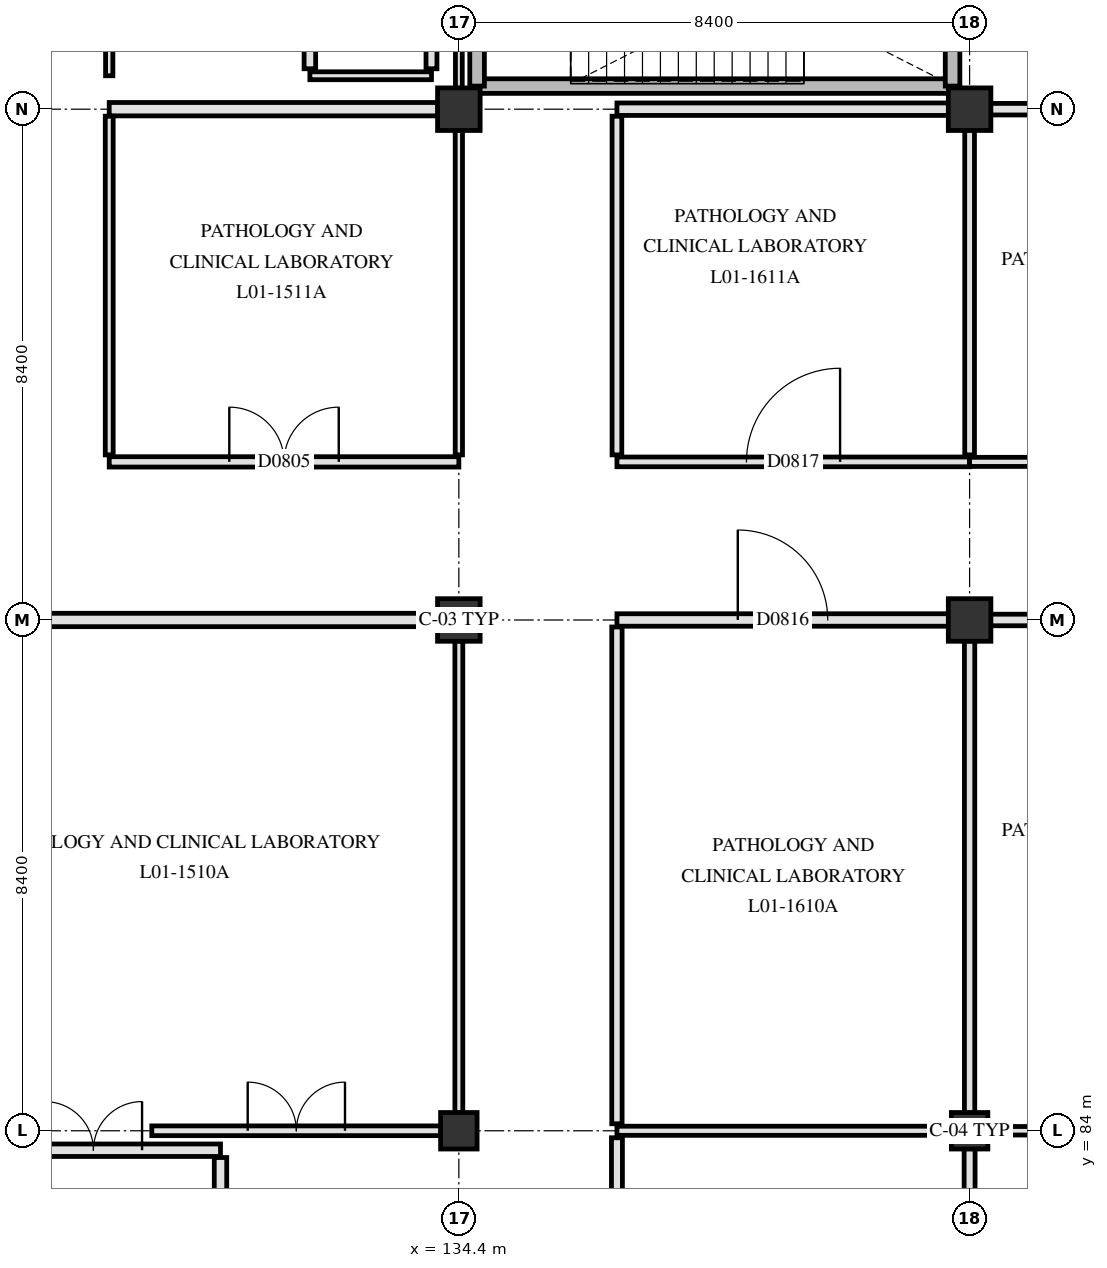
"""IFC4 building model, lengths in metres.
Left out: names, types, materials, properties, quantities, classifications, styles, units other than length and angle.
Written with IfcOpenShell. Run it as: python <this file> out.ifc"""

import sys

from ifc_helpers import new_model, si_unit, direction, frame, frame_2d, origin, origin_2d, place, context, subcontext, project, spatial, rectangle, extrude, element, fill, save


model = new_model("IFC4")
c1 = context("Model", 3, precision=1e-05, world=origin(), true_north=direction((0.0, 1.0)))
c2 = subcontext(c1, "Body", "Model", "MODEL_VIEW")
j1 = project(units=[si_unit("LENGTHUNIT", "METRE"), si_unit("PLANEANGLEUNIT", "RADIAN")], contexts=[c1])
p1 = place(None, origin())
s1 = spatial("IfcSite", under=j1, at=p1, CompositionType="ELEMENT")
p2 = place(p1, origin())
s2 = spatial("IfcBuilding", under=s1, at=p2, CompositionType="ELEMENT")
p3 = place(p2, frame((0.0, 0.0, 4.8)))
s3 = spatial("IfcBuildingStorey", under=s2, at=p3, CompositionType="ELEMENT", Elevation=4.8)
p4 = place(p3, frame((134.4, 84.0, 0.0), z_axis=(0.0, 0.0, 1.0), x_axis=(1.0, 0.0, 0.0)))
e1 = element("IfcColumn", 1, at=p4, inside=s3, PredefinedType="COLUMN", context=c2, shape_type="SweptSolid", body=[
    extrude(rectangle(XDim=0.6, YDim=0.6, at=origin_2d()), origin(), (0.0, 0.0, 1.0), 4.5),
])
for number, where, z_axis, x_axis in (
    (2, (134.4, 92.4, 0.0), (0.0, 0.0, 1.0), (1.0, 0.0, 0.0)),
    (3, (134.4, 100.8, 0.0), (0.0, 0.0, 1.0), (1.0, 0.0, 0.0)),
):
    element("IfcColumn", number, at=place(p3, frame(where, z_axis=z_axis, x_axis=x_axis)), inside=s3, PredefinedType="COLUMN", context=c2, shape_type="SweptSolid", body=[
        extrude(rectangle(XDim=0.7, YDim=0.7, at=origin_2d()), origin(), (0.0, 0.0, 1.0), 4.5),
    ])
p5 = place(p3, frame((142.8, 84.0, 0.0), z_axis=(0.0, 0.0, 1.0), x_axis=(1.0, 0.0, 0.0)))
e4 = element("IfcColumn", 4, at=p5, inside=s3, PredefinedType="COLUMN", context=c2, shape_type="SweptSolid", body=[
    extrude(rectangle(XDim=0.6, YDim=0.6, at=origin_2d()), origin(), (0.0, 0.0, 1.0), 4.5),
])
for number, where, z_axis, x_axis in (
    (5, (142.8, 92.4, 0.0), (0.0, 0.0, 1.0), (1.0, 0.0, 0.0)),
    (6, (142.8, 100.8, 0.0), (0.0, 0.0, 1.0), (1.0, 0.0, 0.0)),
):
    element("IfcColumn", number, at=place(p3, frame(where, z_axis=z_axis, x_axis=x_axis)), inside=s3, PredefinedType="COLUMN", context=c2, shape_type="SweptSolid", body=[
        extrude(rectangle(XDim=0.7, YDim=0.7, at=origin_2d()), origin(), (0.0, 0.0, 1.0), 4.5),
    ])
p6 = place(p3, frame((134.7, 101.18, 0.0), z_axis=(0.0, 0.0, 1.0), x_axis=(1.0, 0.0, 0.0)))
e7 = element("IfcWall", 7, at=p6, inside=s3, PredefinedType="SHEAR", context=c2, shape_type="SweptSolid", body=[
    extrude(rectangle(XDim=7.82, YDim=0.24, at=frame_2d((3.91, 0.0))), origin(), (0.0, 0.0, 1.0), 4.15),
])
for number, where, z_axis, x_axis in (
    (8, (134.7, 101.18, 0.0), (0.0, 0.0, 1.0), (0.0, 1.0, 0.0)),
    (9, (142.52, 101.18, 0.0), (0.0, 0.0, 1.0), (0.0, 1.0, 0.0)),
):
    element("IfcWall", number, at=place(p3, frame(where, z_axis=z_axis, x_axis=x_axis)), inside=s3, PredefinedType="SHEAR", context=c2, shape_type="SweptSolid", body=[
        extrude(rectangle(XDim=3.32, YDim=0.24, at=frame_2d((1.66, 0.0))), origin(), (0.0, 0.0, 1.0), 4.15),
    ])
p7 = place(p3, frame((130.48, 79.44, 0.0), z_axis=(0.0, 0.0, 1.0), x_axis=(0.0, 1.0, 0.0)))
e10 = element("IfcWall", 10, at=p7, inside=s3, PredefinedType="PARTITIONING", context=c2, shape_type="SweptSolid", body=[
    extrude(rectangle(XDim=4.12, YDim=0.205, at=frame_2d((2.06, 0.0))), origin(), (0.0, 0.0, 1.0), 4.14),
])
p8 = place(p3, frame((126.3, 83.68, 0.0), z_axis=(0.0, 0.0, 1.0), x_axis=(1.0, 0.0, 0.0)))
e11 = element("IfcWall", 11, at=p8, inside=s3, PredefinedType="PARTITIONING", context=c2, shape_type="SweptSolid", body=[
    extrude(rectangle(XDim=4.18, YDim=0.205, at=frame_2d((2.09, 0.0))), origin(), (0.0, 0.0, 1.0), 3.54),
])
p9 = place(p8, frame((1.29, 0.0, 0.0)))
e12 = element("IfcOpeningElement", 12, at=p9, cuts=e11, PredefinedType="OPENING", context=c2, shape_type="SweptSolid", body=[
    extrude(rectangle(XDim=1.6, YDim=2.25, at=frame_2d((0.8, 1.125))), frame((0.0, 0.113, 0.0), z_axis=(0.0, -1.0, 0.0), x_axis=(1.0, 0.0, 0.0)), (0.0, 0.0, 1.0), 0.225),
])
p10 = place(p3, frame((129.35, 84.0, 0.0), z_axis=(0.0, 0.0, 1.0), x_axis=(1.0, 0.0, 0.0)))
e13 = element("IfcWall", 13, at=p10, inside=s3, PredefinedType="PARTITIONING", context=c2, shape_type="SweptSolid", body=[
    extrude(rectangle(XDim=4.755, YDim=0.16, at=frame_2d((2.377, 0.0))), origin(), (0.0, 0.0, 1.0), 3.54),
])
p11 = place(p10, frame((1.577, 0.0, 0.0)))
e14 = element("IfcOpeningElement", 14, at=p11, cuts=e13, PredefinedType="OPENING", context=c2, shape_type="SweptSolid", body=[
    extrude(rectangle(XDim=1.6, YDim=2.25, at=frame_2d((0.8, 1.125))), frame((0.0, 0.09, 0.0), z_axis=(0.0, -1.0, 0.0), x_axis=(1.0, 0.0, 0.0)), (0.0, 0.0, 1.0), 0.18),
])
p12 = place(p3, frame((137.0, 84.0, 0.0), z_axis=(0.0, 0.0, 1.0), x_axis=(1.0, 0.0, 0.0)))
e15 = element("IfcWall", 15, at=p12, inside=s3, PredefinedType="PARTITIONING", context=c2, shape_type="SweptSolid", body=[
    extrude(rectangle(XDim=5.505, YDim=0.15, at=frame_2d((2.752, 0.0))), origin(), (0.0, 0.0, 1.0), 3.54),
])
p13 = place(p3, frame((143.095, 84.0, 0.0), z_axis=(0.0, 0.0, 1.0), x_axis=(1.0, 0.0, 0.0)))
e16 = element("IfcWall", 16, at=p13, inside=s3, PredefinedType="PARTITIONING", context=c2, shape_type="SweptSolid", body=[
    extrude(rectangle(XDim=7.81, YDim=0.14, at=frame_2d((3.905, 0.0))), origin(), (0.0, 0.0, 1.0), 3.54),
])
p14 = place(p13, frame((3.295, 0.0, 0.0)))
e17 = element("IfcOpeningElement", 17, at=p14, cuts=e16, PredefinedType="OPENING", context=c2, shape_type="SweptSolid", body=[
    extrude(rectangle(XDim=1.22, YDim=2.18, at=frame_2d((0.61, 1.09))), frame((0.0, 0.08, 0.0), z_axis=(0.0, -1.0, 0.0), x_axis=(1.0, 0.0, 0.0)), (0.0, 0.0, 1.0), 0.16),
])
p15 = place(p3, frame((126.395, 92.4, 0.0), z_axis=(0.0, 0.0, 1.0), x_axis=(1.0, 0.0, 0.0)))
e18 = element("IfcWall", 18, at=p15, inside=s3, PredefinedType="PARTITIONING", context=c2, shape_type="SweptSolid", body=[
    extrude(rectangle(XDim=7.66, YDim=0.22, at=frame_2d((3.83, 0.0))), origin(), (0.0, 0.0, 1.0), 3.54),
])
p16 = place(p3, frame((137.0, 92.4, 0.0), z_axis=(0.0, 0.0, 1.0), x_axis=(1.0, 0.0, 0.0)))
e19 = element("IfcWall", 19, at=p16, inside=s3, PredefinedType="PARTITIONING", context=c2, shape_type="SweptSolid", body=[
    extrude(rectangle(XDim=5.455, YDim=0.205, at=frame_2d((2.728, 0.0))), origin(), (0.0, 0.0, 1.0), 3.54),
])
p17 = place(p16, frame((1.988, 0.0, 0.0)))
e20 = element("IfcOpeningElement", 20, at=p17, cuts=e19, PredefinedType="OPENING", context=c2, shape_type="SweptSolid", body=[
    extrude(rectangle(XDim=1.48, YDim=2.22, at=frame_2d((0.74, 1.11))), frame((0.0, 0.113, 0.0), z_axis=(0.0, -1.0, 0.0), x_axis=(1.0, 0.0, 0.0)), (0.0, 0.0, 1.0), 0.225),
])
p18 = place(p3, frame((143.145, 92.4, 0.0), z_axis=(0.0, 0.0, 1.0), x_axis=(1.0, 0.0, 0.0)))
e21 = element("IfcWall", 21, at=p18, inside=s3, PredefinedType="PARTITIONING", context=c2, shape_type="SweptSolid", body=[
    extrude(rectangle(XDim=7.71, YDim=0.19, at=frame_2d((3.855, 0.0))), origin(), (0.0, 0.0, 1.0), 3.54),
])
p19 = place(p18, frame((3.195, 0.0, 0.0)))
e22 = element("IfcOpeningElement", 22, at=p19, cuts=e21, PredefinedType="OPENING", context=c2, shape_type="SweptSolid", body=[
    extrude(rectangle(XDim=1.32, YDim=2.18, at=frame_2d((0.66, 1.09))), frame((0.0, 0.105, 0.0), z_axis=(0.0, -1.0, 0.0), x_axis=(1.0, 0.0, 0.0)), (0.0, 0.0, 1.0), 0.21),
])
p20 = place(p3, frame((128.65, 95.0, 0.0), z_axis=(0.0, 0.0, 1.0), x_axis=(1.0, 0.0, 0.0)))
e23 = element("IfcWall", 23, at=p20, inside=s3, PredefinedType="PARTITIONING", context=c2, shape_type="SweptSolid", body=[
    extrude(rectangle(XDim=5.75, YDim=0.17, at=frame_2d((2.875, 0.0))), origin(), (0.0, 0.0, 1.0), 3.59),
])
p21 = place(p20, frame((1.975, 0.0, 0.0)))
e24 = element("IfcOpeningElement", 24, at=p21, cuts=e23, PredefinedType="OPENING", context=c2, shape_type="SweptSolid", body=[
    extrude(rectangle(XDim=1.8, YDim=2.25, at=frame_2d((0.9, 1.125))), frame((0.0, 0.095, 0.0), z_axis=(0.0, -1.0, 0.0), x_axis=(1.0, 0.0, 0.0)), (0.0, 0.0, 1.0), 0.19),
])
p22 = place(p3, frame((137.0, 95.0, 0.0), z_axis=(0.0, 0.0, 1.0), x_axis=(1.0, 0.0, 0.0)))
e25 = element("IfcWall", 25, at=p22, inside=s3, PredefinedType="PARTITIONING", context=c2, shape_type="SweptSolid", body=[
    extrude(rectangle(XDim=5.8, YDim=0.16, at=frame_2d((2.9, 0.0))), origin(), (0.0, 0.0, 1.0), 3.59),
])
p23 = place(p22, frame((2.13, 0.0, 0.0)))
e26 = element("IfcOpeningElement", 26, at=p23, cuts=e25, PredefinedType="OPENING", context=c2, shape_type="SweptSolid", body=[
    extrude(rectangle(XDim=1.54, YDim=2.24, at=frame_2d((0.77, 1.12))), frame((0.0, 0.09, 0.0), z_axis=(0.0, -1.0, 0.0), x_axis=(1.0, 0.0, 0.0)), (0.0, 0.0, 1.0), 0.18),
])
p24 = place(p3, frame((142.8, 95.0, 0.0), z_axis=(0.0, 0.0, 1.0), x_axis=(1.0, 0.0, 0.0)))
e27 = element("IfcWall", 27, at=p24, inside=s3, PredefinedType="PARTITIONING", context=c2, shape_type="SweptSolid", body=[
    extrude(rectangle(XDim=8.4, YDim=0.15, at=frame_2d((4.2, 0.0))), origin(), (0.0, 0.0, 1.0), 3.59),
])
p25 = place(p24, frame((3.74, 0.0, 0.0)))
e28 = element("IfcOpeningElement", 28, at=p25, cuts=e27, PredefinedType="OPENING", context=c2, shape_type="SweptSolid", body=[
    extrude(rectangle(XDim=0.92, YDim=2.08, at=frame_2d((0.46, 1.04))), frame((0.0, 0.085, 0.0), z_axis=(0.0, -1.0, 0.0), x_axis=(1.0, 0.0, 0.0)), (0.0, 0.0, 1.0), 0.17),
])
p26 = place(p3, frame((128.65, 100.8, 0.0), z_axis=(0.0, 0.0, 1.0), x_axis=(1.0, 0.0, 0.0)))
e29 = element("IfcWall", 29, at=p26, inside=s3, PredefinedType="PARTITIONING", context=c2, shape_type="SweptSolid", body=[
    extrude(rectangle(XDim=5.405, YDim=0.22, at=frame_2d((2.703, 0.0))), origin(), (0.0, 0.0, 1.0), 3.54),
])
p27 = place(p3, frame((137.0, 100.8, 0.0), z_axis=(0.0, 0.0, 1.0), x_axis=(1.0, 0.0, 0.0)))
e30 = element("IfcWall", 30, at=p27, inside=s3, PredefinedType="PARTITIONING", context=c2, shape_type="SweptSolid", body=[
    extrude(rectangle(XDim=5.455, YDim=0.205, at=frame_2d((2.728, 0.0))), origin(), (0.0, 0.0, 1.0), 3.54),
])
p28 = place(p3, frame((143.145, 100.8, 0.0), z_axis=(0.0, 0.0, 1.0), x_axis=(1.0, 0.0, 0.0)))
e31 = element("IfcWall", 31, at=p28, inside=s3, PredefinedType="PARTITIONING", context=c2, shape_type="SweptSolid", body=[
    extrude(rectangle(XDim=7.71, YDim=0.19, at=frame_2d((3.855, 0.0))), origin(), (0.0, 0.0, 1.0), 3.54),
])
p29 = place(p3, frame((131.95, 101.35, 0.0), z_axis=(0.0, 0.0, 1.0), x_axis=(1.0, 0.0, 0.0)))
e32 = element("IfcWall", 32, at=p29, inside=s3, PredefinedType="PARTITIONING", context=c2, shape_type="SweptSolid", body=[
    extrude(rectangle(XDim=2.0, YDim=0.13, at=frame_2d((1.0, 0.0))), origin(), (0.0, 0.0, 1.0), 4.14),
])
p30 = place(p3, frame((128.65, 95.115, 0.0), z_axis=(0.0, 0.0, 1.0), x_axis=(0.0, 1.0, 0.0)))
e33 = element("IfcWall", 33, at=p30, inside=s3, PredefinedType="PARTITIONING", context=c2, shape_type="SweptSolid", body=[
    extrude(rectangle(XDim=5.57, YDim=0.13, at=frame_2d((2.785, 0.0))), origin(), (0.0, 0.0, 1.0), 3.54),
])
p31 = place(p3, frame((128.65, 101.35, 0.0), z_axis=(0.0, 0.0, 1.0), x_axis=(0.0, 1.0, 0.0)))
e34 = element("IfcWall", 34, at=p31, inside=s3, PredefinedType="PARTITIONING", context=c2, shape_type="SweptSolid", body=[
    extrude(rectangle(XDim=2.1, YDim=0.12, at=frame_2d((1.05, 0.0))), origin(), (0.0, 0.0, 1.0), 4.14),
])
p32 = place(p3, frame((131.95, 101.465, 0.0), z_axis=(0.0, 0.0, 1.0), x_axis=(0.0, 1.0, 0.0)))
e35 = element("IfcWall", 35, at=p32, inside=s3, PredefinedType="PARTITIONING", context=c2, shape_type="SweptSolid", body=[
    extrude(rectangle(XDim=5.02, YDim=0.19, at=frame_2d((2.51, 0.0))), origin(), (0.0, 0.0, 1.0), 4.14),
])
p33 = place(p3, frame((133.95, 101.465, 0.0), z_axis=(0.0, 0.0, 1.0), x_axis=(0.0, 1.0, 0.0)))
e36 = element("IfcWall", 36, at=p33, inside=s3, PredefinedType="PARTITIONING", context=c2, shape_type="SweptSolid", body=[
    extrude(rectangle(XDim=5.135, YDim=0.18, at=frame_2d((2.567, 0.0))), origin(), (0.0, 0.0, 1.0), 4.14),
])
p34 = place(p3, frame((134.4, 84.295, 0.0), z_axis=(0.0, 0.0, 1.0), x_axis=(0.0, 1.0, 0.0)))
e37 = element("IfcWall", 37, at=p34, inside=s3, PredefinedType="PARTITIONING", context=c2, shape_type="SweptSolid", body=[
    extrude(rectangle(XDim=7.76, YDim=0.13, at=frame_2d((3.88, 0.0))), origin(), (0.0, 0.0, 1.0), 3.59),
])
p35 = place(p3, frame((134.4, 95.115, 0.0), z_axis=(0.0, 0.0, 1.0), x_axis=(0.0, 1.0, 0.0)))
e38 = element("IfcWall", 38, at=p35, inside=s3, PredefinedType="PARTITIONING", context=c2, shape_type="SweptSolid", body=[
    extrude(rectangle(XDim=5.34, YDim=0.12, at=frame_2d((2.67, 0.0))), origin(), (0.0, 0.0, 1.0), 3.59),
])
p36 = place(p3, frame((134.4, 101.145, 0.0), z_axis=(0.0, 0.0, 1.0), x_axis=(0.0, 1.0, 0.0)))
e39 = element("IfcWall", 39, at=p36, inside=s3, PredefinedType="PARTITIONING", context=c2, shape_type="SweptSolid", body=[
    extrude(rectangle(XDim=5.455, YDim=0.112, at=frame_2d((2.728, 0.0))), origin(), (0.0, 0.0, 1.0), 3.59),
])
p37 = place(p3, frame((137.0, 78.315, 0.0), z_axis=(0.0, 0.0, 1.0), x_axis=(0.0, 1.0, 0.0)))
e40 = element("IfcWall", 40, at=p37, inside=s3, PredefinedType="PARTITIONING", context=c2, shape_type="SweptSolid", body=[
    extrude(rectangle(XDim=5.57, YDim=0.18, at=frame_2d((2.785, 0.0))), origin(), (0.0, 0.0, 1.0), 3.54),
])
p38 = place(p3, frame((137.0, 84.115, 0.0), z_axis=(0.0, 0.0, 1.0), x_axis=(0.0, 1.0, 0.0)))
e41 = element("IfcWall", 41, at=p38, inside=s3, PredefinedType="PARTITIONING", context=c2, shape_type="SweptSolid", body=[
    extrude(rectangle(XDim=8.17, YDim=0.17, at=frame_2d((4.085, 0.0))), origin(), (0.0, 0.0, 1.0), 3.54),
])
p39 = place(p3, frame((137.0, 95.115, 0.0), z_axis=(0.0, 0.0, 1.0), x_axis=(0.0, 1.0, 0.0)))
e42 = element("IfcWall", 42, at=p39, inside=s3, PredefinedType="PARTITIONING", context=c2, shape_type="SweptSolid", body=[
    extrude(rectangle(XDim=5.57, YDim=0.16, at=frame_2d((2.785, 0.0))), origin(), (0.0, 0.0, 1.0), 3.54),
])
p40 = place(p3, frame((142.8, 78.315, 0.0), z_axis=(0.0, 0.0, 1.0), x_axis=(0.0, 1.0, 0.0)))
e43 = element("IfcWall", 43, at=p40, inside=s3, PredefinedType="PARTITIONING", context=c2, shape_type="SweptSolid", body=[
    extrude(rectangle(XDim=5.39, YDim=0.18, at=frame_2d((2.695, 0.0))), origin(), (0.0, 0.0, 1.0), 4.14),
])
p41 = place(p3, frame((142.8, 84.295, 0.0), z_axis=(0.0, 0.0, 1.0), x_axis=(0.0, 1.0, 0.0)))
e44 = element("IfcWall", 44, at=p41, inside=s3, PredefinedType="PARTITIONING", context=c2, shape_type="SweptSolid", body=[
    extrude(rectangle(XDim=7.76, YDim=0.17, at=frame_2d((3.88, 0.0))), origin(), (0.0, 0.0, 1.0), 3.59),
])
p42 = place(p3, frame((142.8, 95.115, 0.0), z_axis=(0.0, 0.0, 1.0), x_axis=(0.0, 1.0, 0.0)))
e45 = element("IfcWall", 45, at=p42, inside=s3, PredefinedType="PARTITIONING", context=c2, shape_type="SweptSolid", body=[
    extrude(rectangle(XDim=5.34, YDim=0.16, at=frame_2d((2.67, 0.0))), origin(), (0.0, 0.0, 1.0), 3.59),
])
p43 = place(p9, origin())
e46 = element("IfcDoor", 46, at=p43, inside=s3, OperationType="DOUBLE_SWING_LEFT", PredefinedType="DOOR", context=c2, shape_type="SweptSolid", body=[
    extrude(rectangle(XDim=1.6, YDim=2.25, at=frame_2d((0.8, 1.125))), frame((0.0, 0.025, 0.0), z_axis=(0.0, -1.0, 0.0), x_axis=(1.0, 0.0, 0.0)), (0.0, 0.0, 1.0), 0.05),
])
fill(e12, e46)
p44 = place(p11, origin())
e47 = element("IfcDoor", 47, at=p44, inside=s3, OperationType="DOUBLE_SWING_LEFT", PredefinedType="DOOR", context=c2, shape_type="SweptSolid", body=[
    extrude(rectangle(XDim=1.6, YDim=2.25, at=frame_2d((0.8, 1.125))), frame((0.0, 0.025, 0.0), z_axis=(0.0, -1.0, 0.0), x_axis=(1.0, 0.0, 0.0)), (0.0, 0.0, 1.0), 0.05),
])
fill(e14, e47)
p45 = place(p21, origin())
e48 = element("IfcDoor", 48, at=p45, inside=s3, OperationType="DOUBLE_SWING_RIGHT", PredefinedType="DOOR", context=c2, shape_type="SweptSolid", body=[
    extrude(rectangle(XDim=1.8, YDim=2.25, at=frame_2d((0.9, 1.125))), frame((0.0, 0.025, 0.0), z_axis=(0.0, -1.0, 0.0), x_axis=(1.0, 0.0, 0.0)), (0.0, 0.0, 1.0), 0.05),
])
fill(e24, e48)
p46 = place(p17, origin())
e49 = element("IfcDoor", 49, at=p46, inside=s3, OperationType="SINGLE_SWING_LEFT", PredefinedType="DOOR", context=c2, shape_type="SweptSolid", body=[
    extrude(rectangle(XDim=1.48, YDim=2.22, at=frame_2d((0.74, 1.11))), frame((0.0, 0.025, 0.0), z_axis=(0.0, -1.0, 0.0), x_axis=(1.0, 0.0, 0.0)), (0.0, 0.0, 1.0), 0.05),
])
fill(e20, e49)
p47 = place(p23, origin())
e50 = element("IfcDoor", 50, at=p47, inside=s3, OperationType="SINGLE_SWING_RIGHT", PredefinedType="DOOR", context=c2, shape_type="SweptSolid", body=[
    extrude(rectangle(XDim=1.54, YDim=2.24, at=frame_2d((0.77, 1.12))), frame((0.0, 0.025, 0.0), z_axis=(0.0, -1.0, 0.0), x_axis=(1.0, 0.0, 0.0)), (0.0, 0.0, 1.0), 0.05),
])
fill(e26, e50)
save(model, sys.argv[1])
